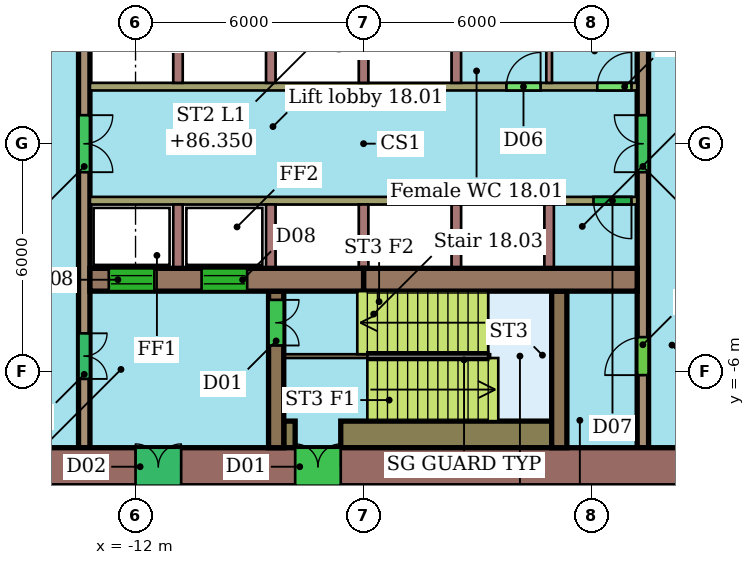
"""IFC4 building model, lengths in metres.
Left out: names, types, materials, properties, quantities, classifications, styles, units other than length and angle.
Written with IfcOpenShell. Run it as: python <this file> out.ifc"""

import sys

from ifc_helpers import new_model, si_unit, direction, frame, frame_2d, origin, place, context, subcontext, project, spatial, rectangle, extrude, element, fill, save


model = new_model("IFC4")
c1 = context("Model", 3, precision=1e-05, world=origin(), true_north=direction((0.0, 1.0)))
c2 = subcontext(c1, "Body", "Model", "MODEL_VIEW")
j1 = project(units=[si_unit("LENGTHUNIT", "METRE"), si_unit("PLANEANGLEUNIT", "RADIAN")], contexts=[c1])
p1 = place(None, origin())
s1 = spatial("IfcSite", under=j1, at=p1, CompositionType="ELEMENT")
p2 = place(p1, origin())
s2 = spatial("IfcBuilding", under=s1, at=p2, CompositionType="ELEMENT")
p3 = place(p2, frame((0.0, 0.0, 84.1)))
s3 = spatial("IfcBuildingStorey", under=s2, at=p3, CompositionType="ELEMENT", Elevation=84.1)
p4 = place(p3, frame((-18.0, -8.5, 0.0), z_axis=(0.0, 0.0, 1.0), x_axis=(1.0, 0.0, 0.0)))
e1 = element("IfcWall", 1, at=p4, inside=s3, PredefinedType="SHEAR", context=c2, shape_type="SweptSolid", body=[
    extrude(rectangle(XDim=24.0, YDim=1.0, at=frame_2d((12.0, 0.0))), origin(), (0.0, 0.0, 1.0), 4.2),
])
p5 = place(p4, frame((10.2, 0.0, 0.0)))
e2 = element("IfcOpeningElement", 2, at=p5, cuts=e1, PredefinedType="OPENING", context=c2, shape_type="SweptSolid", body=[
    extrude(rectangle(XDim=1.2, YDim=2.1, at=frame_2d((0.6, 1.05))), frame((0.0, 0.51, 0.0), z_axis=(0.0, -1.0, 0.0), x_axis=(1.0, 0.0, 0.0)), (0.0, 0.0, 1.0), 1.02),
])
p6 = place(p4, frame((6.0, 0.0, 0.0)))
e3 = element("IfcOpeningElement", 3, at=p6, cuts=e1, PredefinedType="OPENING", context=c2, shape_type="SweptSolid", body=[
    extrude(rectangle(XDim=1.2, YDim=2.1, at=frame_2d((0.6, 1.05))), frame((0.0, 0.51, 0.0), z_axis=(0.0, -1.0, 0.0), x_axis=(1.0, 0.0, 0.0)), (0.0, 0.0, 1.0), 1.02),
])
p7 = place(p3, frame((-13.2, -3.58, 0.0), z_axis=(0.0, 0.0, 1.0), x_axis=(1.0, 0.0, 0.0)))
e4 = element("IfcWall", 4, at=p7, inside=s3, PredefinedType="SHEAR", context=c2, shape_type="SweptSolid", body=[
    extrude(rectangle(XDim=7.2, YDim=0.6, at=frame_2d((3.6, 0.0))), origin(), (0.0, 0.0, 1.0), 4.2),
])
p8 = place(p7, frame((0.496, 0.0, 0.0)))
e5 = element("IfcOpeningElement", 5, at=p8, cuts=e4, PredefinedType="OPENING", context=c2, shape_type="SweptSolid", body=[
    extrude(rectangle(XDim=1.2, YDim=2.1, at=frame_2d((0.6, 1.05))), frame((0.0, 0.31, 0.0), z_axis=(0.0, -1.0, 0.0), x_axis=(1.0, 0.0, 0.0)), (0.0, 0.0, 1.0), 0.62),
])
p9 = place(p7, frame((2.938, 0.0, 0.0)))
e6 = element("IfcOpeningElement", 6, at=p9, cuts=e4, PredefinedType="OPENING", context=c2, shape_type="SweptSolid", body=[
    extrude(rectangle(XDim=1.2, YDim=2.1, at=frame_2d((0.6, 1.05))), frame((0.0, 0.31, 0.0), z_axis=(0.0, -1.0, 0.0), x_axis=(1.0, 0.0, 0.0)), (0.0, 0.0, 1.0), 0.62),
])
p10 = place(p3, frame((-6.0, -3.58, 0.0), z_axis=(0.0, 0.0, 1.0), x_axis=(1.0, 0.0, 0.0)))
e7 = element("IfcWall", 7, at=p10, inside=s3, PredefinedType="SHEAR", context=c2, shape_type="SweptSolid", body=[
    extrude(rectangle(XDim=7.2, YDim=0.6, at=frame_2d((3.6, 0.0))), origin(), (0.0, 0.0, 1.0), 4.2),
])
p11 = place(p3, frame((-13.35, 8.0, 0.0), z_axis=(0.0, 0.0, 1.0), x_axis=(0.0, -1.0, 0.0)))
e8 = element("IfcWall", 8, at=p11, inside=s3, PredefinedType="SHEAR", context=c2, shape_type="SweptSolid", body=[
    extrude(rectangle(XDim=16.0, YDim=0.3, at=frame_2d((8.0, 0.0))), origin(), (0.0, 0.0, 1.0), 4.2),
])
p12 = place(p11, frame((2.69, 0.0, 0.0)))
e9 = element("IfcOpeningElement", 9, at=p12, cuts=e8, PredefinedType="OPENING", context=c2, shape_type="SweptSolid", body=[
    extrude(rectangle(XDim=1.2, YDim=2.1, at=frame_2d((0.6, 1.05))), frame((0.0, 0.16, 0.0), z_axis=(0.0, -1.0, 0.0), x_axis=(1.0, 0.0, 0.0)), (0.0, 0.0, 1.0), 0.32),
])
p13 = place(p11, frame((12.99, 0.0, 0.0)))
e10 = element("IfcOpeningElement", 10, at=p13, cuts=e8, PredefinedType="OPENING", context=c2, shape_type="SweptSolid", body=[
    extrude(rectangle(XDim=1.2, YDim=2.1, at=frame_2d((0.6, 1.05))), frame((0.0, 0.16, 0.0), z_axis=(0.0, -1.0, 0.0), x_axis=(1.0, 0.0, 0.0)), (0.0, 0.0, 1.0), 0.32),
])
p14 = place(p11, frame((7.25, 0.0, 0.0)))
e11 = element("IfcOpeningElement", 11, at=p14, cuts=e8, PredefinedType="OPENING", context=c2, shape_type="SweptSolid", body=[
    extrude(rectangle(XDim=1.5, YDim=2.1, at=frame_2d((0.75, 1.05))), frame((0.0, 0.16, 0.0), z_axis=(0.0, -1.0, 0.0), x_axis=(1.0, 0.0, 0.0)), (0.0, 0.0, 1.0), 0.32),
])
p15 = place(p3, frame((1.35, -8.0, 0.0), z_axis=(0.0, 0.0, 1.0), x_axis=(0.0, 1.0, 0.0)))
e12 = element("IfcWall", 12, at=p15, inside=s3, PredefinedType="SHEAR", context=c2, shape_type="SweptSolid", body=[
    extrude(rectangle(XDim=16.0, YDim=0.3, at=frame_2d((8.0, 0.0))), origin(), (0.0, 0.0, 1.0), 4.2),
])
p16 = place(p15, frame((12.11, 0.0, 0.0)))
e13 = element("IfcOpeningElement", 13, at=p16, cuts=e12, PredefinedType="OPENING", context=c2, shape_type="SweptSolid", body=[
    extrude(rectangle(XDim=1.2, YDim=2.1, at=frame_2d((0.6, 1.05))), frame((0.0, 0.16, 0.0), z_axis=(0.0, -1.0, 0.0), x_axis=(1.0, 0.0, 0.0)), (0.0, 0.0, 1.0), 0.32),
])
p17 = place(p15, frame((1.91, 0.0, 0.0)))
e14 = element("IfcOpeningElement", 14, at=p17, cuts=e12, PredefinedType="OPENING", context=c2, shape_type="SweptSolid", body=[
    extrude(rectangle(XDim=1.0, YDim=2.1, at=frame_2d((0.5, 1.05))), frame((0.0, 0.16, 0.0), z_axis=(0.0, -1.0, 0.0), x_axis=(1.0, 0.0, 0.0)), (0.0, 0.0, 1.0), 0.32),
])
p18 = place(p15, frame((7.25, 0.0, 0.0)))
e15 = element("IfcOpeningElement", 15, at=p18, cuts=e12, PredefinedType="OPENING", context=c2, shape_type="SweptSolid", body=[
    extrude(rectangle(XDim=1.5, YDim=2.1, at=frame_2d((0.75, 1.05))), frame((0.0, 0.16, 0.0), z_axis=(0.0, -1.0, 0.0), x_axis=(1.0, 0.0, 0.0)), (0.0, 0.0, 1.0), 0.32),
])
p19 = place(p3, frame((-13.2, 1.5, 0.0), z_axis=(0.0, 0.0, 1.0), x_axis=(1.0, 0.0, 0.0)))
e16 = element("IfcWall", 16, at=p19, inside=s3, PredefinedType="SHEAR", context=c2, shape_type="SweptSolid", body=[
    extrude(rectangle(XDim=14.4, YDim=0.2, at=frame_2d((7.2, 0.0))), origin(), (0.0, 0.0, 1.0), 4.2),
])
p20 = place(p19, frame((10.958, 0.0, 0.0)))
e17 = element("IfcOpeningElement", 17, at=p20, cuts=e16, PredefinedType="OPENING", context=c2, shape_type="SweptSolid", body=[
    extrude(rectangle(XDim=0.9, YDim=2.1, at=frame_2d((0.45, 1.05))), frame((0.0, 0.11, 0.0), z_axis=(0.0, -1.0, 0.0), x_axis=(1.0, 0.0, 0.0)), (0.0, 0.0, 1.0), 0.22),
])
p21 = place(p19, frame((13.35, 0.0, 0.0)))
e18 = element("IfcOpeningElement", 18, at=p21, cuts=e16, PredefinedType="OPENING", context=c2, shape_type="SweptSolid", body=[
    extrude(rectangle(XDim=0.9, YDim=2.1, at=frame_2d((0.45, 1.05))), frame((0.0, 0.11, 0.0), z_axis=(0.0, -1.0, 0.0), x_axis=(1.0, 0.0, 0.0)), (0.0, 0.0, 1.0), 0.22),
])
p22 = place(p3, frame((1.2, -1.5, 0.0), z_axis=(0.0, 0.0, 1.0), x_axis=(-1.0, 0.0, 0.0)))
e19 = element("IfcWall", 19, at=p22, inside=s3, PredefinedType="SHEAR", context=c2, shape_type="SweptSolid", body=[
    extrude(rectangle(XDim=14.4, YDim=0.2, at=frame_2d((7.2, 0.0))), origin(), (0.0, 0.0, 1.0), 4.2),
])
p23 = place(p22, frame((0.15, 0.0, 0.0)))
e20 = element("IfcOpeningElement", 20, at=p23, cuts=e19, PredefinedType="OPENING", context=c2, shape_type="SweptSolid", body=[
    extrude(rectangle(XDim=1.0, YDim=2.1, at=frame_2d((0.5, 1.05))), frame((0.0, 0.11, 0.0), z_axis=(0.0, -1.0, 0.0), x_axis=(1.0, 0.0, 0.0)), (0.0, 0.0, 1.0), 0.22),
])
p24 = place(p3, frame((-8.3, -3.88, 0.0), z_axis=(0.0, 0.0, 1.0), x_axis=(0.0, -1.0, 0.0)))
e21 = element("IfcWall", 21, at=p24, inside=s3, PredefinedType="SHEAR", context=c2, shape_type="SweptSolid", body=[
    extrude(rectangle(XDim=4.12, YDim=0.4, at=frame_2d((2.06, 0.0))), origin(), (0.0, 0.0, 1.0), 4.2),
])
p25 = place(p24, frame((0.23, 0.0, 0.0)))
e22 = element("IfcOpeningElement", 22, at=p25, cuts=e21, PredefinedType="OPENING", context=c2, shape_type="SweptSolid", body=[
    extrude(rectangle(XDim=1.2, YDim=2.1, at=frame_2d((0.6, 1.05))), frame((0.0, 0.21, 0.0), z_axis=(0.0, -1.0, 0.0), x_axis=(1.0, 0.0, 0.0)), (0.0, 0.0, 1.0), 0.42),
])
p26 = place(p3, frame((-0.85, -3.88, 0.0), z_axis=(0.0, 0.0, 1.0), x_axis=(0.0, -1.0, 0.0)))
e23 = element("IfcWall", 23, at=p26, inside=s3, PredefinedType="SHEAR", context=c2, shape_type="SweptSolid", body=[
    extrude(rectangle(XDim=4.12, YDim=0.4, at=frame_2d((2.06, 0.0))), origin(), (0.0, 0.0, 1.0), 4.2),
])
p27 = place(p3, frame((-8.1, -7.65, 0.0), z_axis=(0.0, 0.0, 1.0), x_axis=(1.0, 0.0, 0.0)))
e24 = element("IfcWall", 24, at=p27, inside=s3, PredefinedType="SHEAR", context=c2, shape_type="SweptSolid", body=[
    extrude(rectangle(XDim=0.3, YDim=0.7, at=frame_2d((0.15, 0.0))), origin(), (0.0, 0.0, 1.0), 4.2),
])
p28 = place(p3, frame((-6.6, -7.65, 0.0), z_axis=(0.0, 0.0, 1.0), x_axis=(1.0, 0.0, 0.0)))
e25 = element("IfcWall", 25, at=p28, inside=s3, PredefinedType="SHEAR", context=c2, shape_type="SweptSolid", body=[
    extrude(rectangle(XDim=5.55, YDim=0.7, at=frame_2d((2.775, 0.0))), origin(), (0.0, 0.0, 1.0), 4.2),
])
p29 = place(p3, frame((-8.1, -5.59, 0.0), z_axis=(0.0, 0.0, 1.0), x_axis=(1.0, 0.0, 0.0)))
e26 = element("IfcWall", 26, at=p29, inside=s3, PredefinedType="SHEAR", context=c2, shape_type="SweptSolid", body=[
    extrude(rectangle(XDim=2.2, YDim=0.1, at=frame_2d((1.1, 0.0))), origin(), (0.0, 0.0, 1.0), 4.2),
])
for number, where, z_axis, x_axis in (
    (27, (-10.883, 1.6, 0.0), (0.0, 0.0, 1.0), (0.0, 1.0, 0.0)),
    (28, (-8.442, 1.6, 0.0), (0.0, 0.0, 1.0), (0.0, 1.0, 0.0)),
    (29, (-6.0, 1.6, 0.0), (0.0, 0.0, 1.0), (0.0, 1.0, 0.0)),
    (30, (-3.558, 1.6, 0.0), (0.0, 0.0, 1.0), (0.0, 1.0, 0.0)),
):
    element("IfcWall", number, at=place(p3, frame(where, z_axis=z_axis, x_axis=x_axis)), inside=s3, PredefinedType="SHEAR", context=c2, shape_type="SweptSolid", body=[
        extrude(rectangle(XDim=1.68, YDim=0.25, at=frame_2d((0.84, 0.0))), origin(), (0.0, 0.0, 1.0), 4.2),
    ])
p30 = place(p3, frame((-1.117, 1.6, 0.0), z_axis=(0.0, 0.0, 1.0), x_axis=(0.0, 1.0, 0.0)))
e31 = element("IfcWall", 31, at=p30, inside=s3, PredefinedType="PARTITIONING", context=c2, shape_type="SweptSolid", body=[
    extrude(rectangle(XDim=1.68, YDim=0.15, at=frame_2d((0.84, 0.0))), origin(), (0.0, 0.0, 1.0), 4.2),
])
for number, where, z_axis, x_axis in (
    (32, (-10.883, -1.6, 0.0), (0.0, 0.0, 1.0), (0.0, -1.0, 0.0)),
    (33, (-8.442, -1.6, 0.0), (0.0, 0.0, 1.0), (0.0, -1.0, 0.0)),
    (34, (-6.0, -1.6, 0.0), (0.0, 0.0, 1.0), (0.0, -1.0, 0.0)),
    (35, (-3.558, -1.6, 0.0), (0.0, 0.0, 1.0), (0.0, -1.0, 0.0)),
    (36, (-1.117, -1.6, 0.0), (0.0, 0.0, 1.0), (0.0, -1.0, 0.0)),
):
    element("IfcWall", number, at=place(p3, frame(where, z_axis=z_axis, x_axis=x_axis)), inside=s3, PredefinedType="SHEAR", context=c2, shape_type="SweptSolid", body=[
        extrude(rectangle(XDim=1.68, YDim=0.25, at=frame_2d((0.84, 0.0))), origin(), (0.0, 0.0, 1.0), 4.2),
    ])
p31 = place(p5, origin())
e37 = element("IfcDoor", 37, at=p31, inside=s3, OperationType="DOUBLE_DOOR_SINGLE_SWING", PredefinedType="NOTDEFINED", context=c2, shape_type="SweptSolid", body=[
    extrude(rectangle(XDim=1.2, YDim=2.1, at=frame_2d((0.6, 1.05))), frame((0.0, 0.025, 0.0), z_axis=(0.0, -1.0, 0.0), x_axis=(1.0, 0.0, 0.0)), (0.0, 0.0, 1.0), 0.05),
])
fill(e2, e37)
p32 = place(p6, origin())
e38 = element("IfcDoor", 38, at=p32, inside=s3, OperationType="DOUBLE_DOOR_SINGLE_SWING", PredefinedType="NOTDEFINED", context=c2, shape_type="SweptSolid", body=[
    extrude(rectangle(XDim=1.2, YDim=2.1, at=frame_2d((0.6, 1.05))), frame((0.0, 0.025, 0.0), z_axis=(0.0, -1.0, 0.0), x_axis=(1.0, 0.0, 0.0)), (0.0, 0.0, 1.0), 0.05),
])
fill(e3, e38)
p33 = place(p8, origin())
e39 = element("IfcDoor", 39, at=p33, inside=s3, OperationType="DOUBLE_DOOR_SLIDING", PredefinedType="NOTDEFINED", context=c2, shape_type="SweptSolid", body=[
    extrude(rectangle(XDim=1.2, YDim=2.1, at=frame_2d((0.6, 1.05))), frame((0.0, 0.025, 0.0), z_axis=(0.0, -1.0, 0.0), x_axis=(1.0, 0.0, 0.0)), (0.0, 0.0, 1.0), 0.05),
])
fill(e5, e39)
p34 = place(p9, origin())
e40 = element("IfcDoor", 40, at=p34, inside=s3, OperationType="DOUBLE_DOOR_SLIDING", PredefinedType="NOTDEFINED", context=c2, shape_type="SweptSolid", body=[
    extrude(rectangle(XDim=1.2, YDim=2.1, at=frame_2d((0.6, 1.05))), frame((0.0, 0.025, 0.0), z_axis=(0.0, -1.0, 0.0), x_axis=(1.0, 0.0, 0.0)), (0.0, 0.0, 1.0), 0.05),
])
fill(e6, e40)
p35 = place(p13, origin())
e41 = element("IfcDoor", 41, at=p35, inside=s3, OperationType="DOUBLE_DOOR_SINGLE_SWING", PredefinedType="NOTDEFINED", context=c2, shape_type="SweptSolid", body=[
    extrude(rectangle(XDim=1.2, YDim=2.1, at=frame_2d((0.6, 1.05))), frame((0.0, 0.025, 0.0), z_axis=(0.0, -1.0, 0.0), x_axis=(1.0, 0.0, 0.0)), (0.0, 0.0, 1.0), 0.05),
])
fill(e10, e41)
p36 = place(p14, origin())
e42 = element("IfcDoor", 42, at=p36, inside=s3, OperationType="DOUBLE_DOOR_SINGLE_SWING", PredefinedType="NOTDEFINED", context=c2, shape_type="SweptSolid", body=[
    extrude(rectangle(XDim=1.5, YDim=2.1, at=frame_2d((0.75, 1.05))), frame((0.0, 0.025, 0.0), z_axis=(0.0, -1.0, 0.0), x_axis=(1.0, 0.0, 0.0)), (0.0, 0.0, 1.0), 0.05),
])
fill(e11, e42)
p37 = place(p17, origin())
e43 = element("IfcDoor", 43, at=p37, inside=s3, OperationType="SINGLE_SWING_LEFT", PredefinedType="NOTDEFINED", context=c2, shape_type="SweptSolid", body=[
    extrude(rectangle(XDim=1.0, YDim=2.1, at=frame_2d((0.5, 1.05))), frame((0.0, 0.025, 0.0), z_axis=(0.0, -1.0, 0.0), x_axis=(1.0, 0.0, 0.0)), (0.0, 0.0, 1.0), 0.05),
])
fill(e14, e43)
p38 = place(p18, origin())
e44 = element("IfcDoor", 44, at=p38, inside=s3, OperationType="DOUBLE_DOOR_SINGLE_SWING", PredefinedType="NOTDEFINED", context=c2, shape_type="SweptSolid", body=[
    extrude(rectangle(XDim=1.5, YDim=2.1, at=frame_2d((0.75, 1.05))), frame((0.0, 0.025, 0.0), z_axis=(0.0, -1.0, 0.0), x_axis=(1.0, 0.0, 0.0)), (0.0, 0.0, 1.0), 0.05),
])
fill(e15, e44)
p39 = place(p20, origin())
e45 = element("IfcDoor", 45, at=p39, inside=s3, OperationType="SINGLE_SWING_RIGHT", PredefinedType="NOTDEFINED", context=c2, shape_type="SweptSolid", body=[
    extrude(rectangle(XDim=0.9, YDim=2.1, at=frame_2d((0.45, 1.05))), frame((0.0, 0.025, 0.0), z_axis=(0.0, -1.0, 0.0), x_axis=(1.0, 0.0, 0.0)), (0.0, 0.0, 1.0), 0.05),
])
fill(e17, e45)
p40 = place(p21, origin())
e46 = element("IfcDoor", 46, at=p40, inside=s3, OperationType="SINGLE_SWING_RIGHT", PredefinedType="NOTDEFINED", context=c2, shape_type="SweptSolid", body=[
    extrude(rectangle(XDim=0.9, YDim=2.1, at=frame_2d((0.45, 1.05))), frame((0.0, 0.025, 0.0), z_axis=(0.0, -1.0, 0.0), x_axis=(1.0, 0.0, 0.0)), (0.0, 0.0, 1.0), 0.05),
])
fill(e18, e46)
p41 = place(p23, origin())
e47 = element("IfcDoor", 47, at=p41, inside=s3, OperationType="SINGLE_SWING_LEFT", PredefinedType="NOTDEFINED", context=c2, shape_type="SweptSolid", body=[
    extrude(rectangle(XDim=1.0, YDim=2.1, at=frame_2d((0.5, 1.05))), frame((0.0, 0.025, 0.0), z_axis=(0.0, -1.0, 0.0), x_axis=(1.0, 0.0, 0.0)), (0.0, 0.0, 1.0), 0.05),
])
fill(e20, e47)
p42 = place(p25, origin())
e48 = element("IfcDoor", 48, at=p42, inside=s3, OperationType="DOUBLE_DOOR_SINGLE_SWING", PredefinedType="NOTDEFINED", context=c2, shape_type="SweptSolid", body=[
    extrude(rectangle(XDim=1.2, YDim=2.1, at=frame_2d((0.6, 1.05))), frame((0.0, 0.025, 0.0), z_axis=(0.0, -1.0, 0.0), x_axis=(1.0, 0.0, 0.0)), (0.0, 0.0, 1.0), 0.05),
])
fill(e22, e48)
save(model, sys.argv[1])
